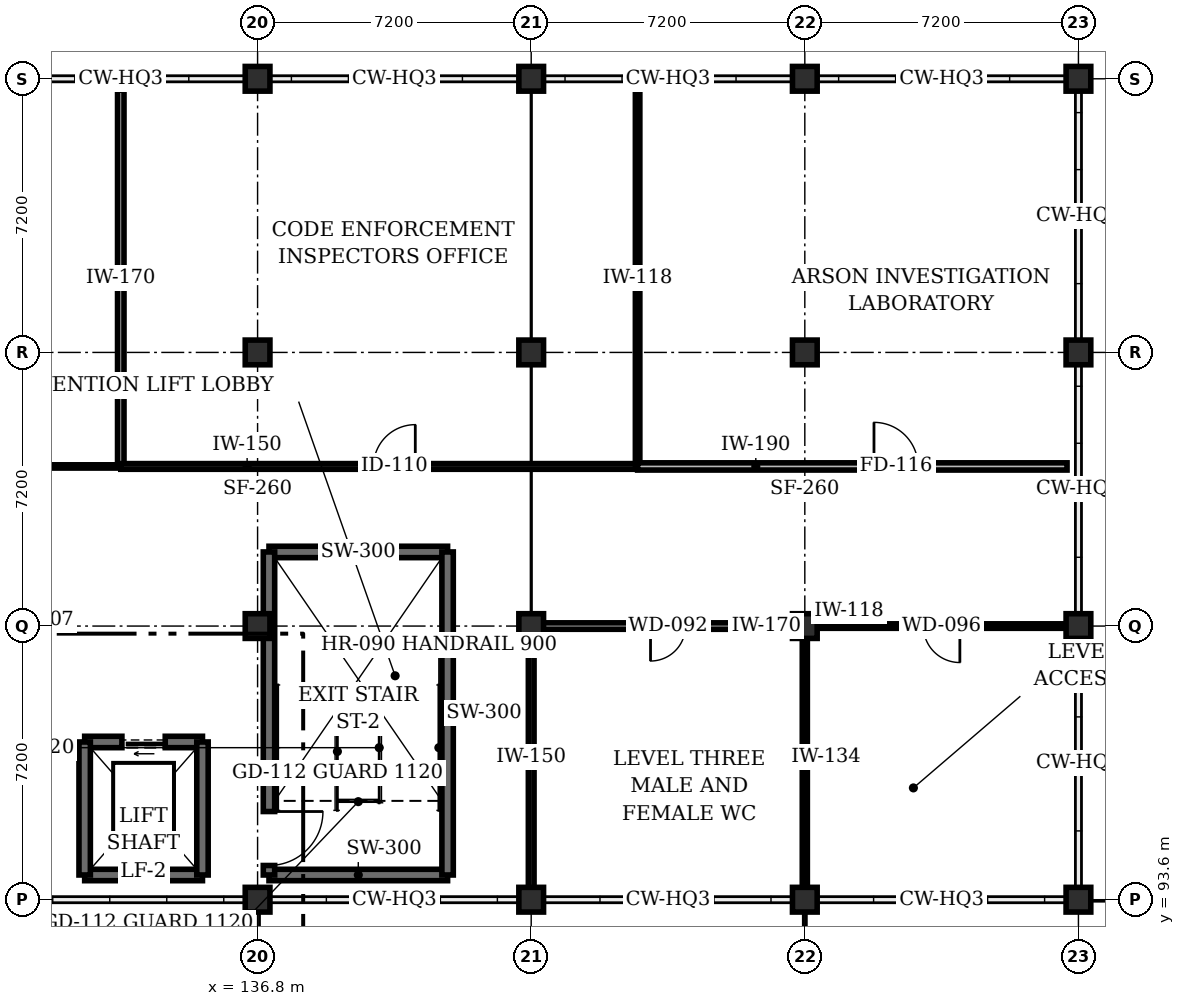
"""IFC4 building model, lengths in metres.
Left out: names, types, materials, properties, quantities, classifications, styles, units other than length and angle.
Written with IfcOpenShell. Run it as: python <this file> out.ifc"""

import sys

from ifc_helpers import new_model, si_unit, direction, frame, frame_2d, origin, origin_2d, place, context, subcontext, project, spatial, rectangle, extrude, element, fill, save


model = new_model("IFC4")
c1 = context("Model", 3, precision=1e-05, world=origin(), true_north=direction((0.0, 1.0)))
c2 = subcontext(c1, "Body", "Model", "MODEL_VIEW")
j1 = project(units=[si_unit("LENGTHUNIT", "METRE"), si_unit("PLANEANGLEUNIT", "RADIAN")], contexts=[c1])
p1 = place(None, origin())
s1 = spatial("IfcSite", under=j1, at=p1, CompositionType="ELEMENT")
p2 = place(p1, origin())
s2 = spatial("IfcBuilding", under=s1, at=p2, CompositionType="ELEMENT")
p3 = place(p2, frame((0.0, 0.0, 10.2)))
s3 = spatial("IfcBuildingStorey", under=s2, at=p3, CompositionType="ELEMENT", Elevation=10.2)
for number, where, z_axis, x_axis in (
    (1, (136.8, 93.6, 0.0), (0.0, 0.0, 1.0), (1.0, 0.0, 0.0)),
    (2, (136.8, 100.8, 0.0), (0.0, 0.0, 1.0), (1.0, 0.0, 0.0)),
    (3, (136.8, 108.0, 0.0), (0.0, 0.0, 1.0), (1.0, 0.0, 0.0)),
    (4, (136.8, 115.2, 0.0), (0.0, 0.0, 1.0), (1.0, 0.0, 0.0)),
    (5, (144.0, 93.6, 0.0), (0.0, 0.0, 1.0), (1.0, 0.0, 0.0)),
    (6, (144.0, 100.8, 0.0), (0.0, 0.0, 1.0), (1.0, 0.0, 0.0)),
    (7, (144.0, 108.0, 0.0), (0.0, 0.0, 1.0), (1.0, 0.0, 0.0)),
    (8, (144.0, 115.2, 0.0), (0.0, 0.0, 1.0), (1.0, 0.0, 0.0)),
    (9, (151.2, 93.6, 0.0), (0.0, 0.0, 1.0), (1.0, 0.0, 0.0)),
    (10, (151.2, 100.8, 0.0), (0.0, 0.0, 1.0), (1.0, 0.0, 0.0)),
    (11, (151.2, 108.0, 0.0), (0.0, 0.0, 1.0), (1.0, 0.0, 0.0)),
    (12, (151.2, 115.2, 0.0), (0.0, 0.0, 1.0), (1.0, 0.0, 0.0)),
    (13, (158.4, 93.6, 0.0), (0.0, 0.0, 1.0), (1.0, 0.0, 0.0)),
    (14, (158.4, 100.8, 0.0), (0.0, 0.0, 1.0), (1.0, 0.0, 0.0)),
    (15, (158.4, 108.0, 0.0), (0.0, 0.0, 1.0), (1.0, 0.0, 0.0)),
    (16, (158.4, 115.2, 0.0), (0.0, 0.0, 1.0), (1.0, 0.0, 0.0)),
):
    element("IfcColumn", number, at=place(p3, frame(where, z_axis=z_axis, x_axis=x_axis)), inside=s3, PredefinedType="COLUMN", context=c2, shape_type="SweptSolid", body=[
        extrude(rectangle(XDim=0.65, YDim=0.65, at=origin_2d()), origin(), (0.0, 0.0, 1.0), 4.2),
    ])
for number, where, z_axis, x_axis in (
    (17, (137.1, 94.25, 0.0), (0.0, 0.0, 1.0), (1.0, 0.0, 0.0)),
    (18, (141.8, 102.75, 0.0), (0.0, 0.0, 1.0), (-1.0, 0.0, 0.0)),
):
    element("IfcWall", number, at=place(p3, frame(where, z_axis=z_axis, x_axis=x_axis)), inside=s3, PredefinedType="SHEAR", context=c2, shape_type="SweptSolid", body=[
        extrude(rectangle(XDim=4.7, YDim=0.3, at=frame_2d((2.35, 0.0))), origin(), (0.0, 0.0, 1.0), 3.95),
    ])
p4 = place(p3, frame((137.1, 102.75, 0.0), z_axis=(0.0, 0.0, 1.0), x_axis=(0.0, -1.0, 0.0)))
e19 = element("IfcWall", 19, at=p4, inside=s3, PredefinedType="SHEAR", context=c2, shape_type="SweptSolid", body=[
    extrude(rectangle(XDim=8.5, YDim=0.3, at=frame_2d((4.25, 0.0))), origin(), (0.0, 0.0, 1.0), 3.95),
])
p5 = place(p4, frame((6.83, 0.0, 0.0)))
e20 = element("IfcOpeningElement", 20, at=p5, cuts=e19, PredefinedType="OPENING", context=c2, shape_type="SweptSolid", body=[
    extrude(rectangle(XDim=1.42, YDim=2.22, at=frame_2d((0.71, 1.11))), frame((0.0, 0.16, 0.0), z_axis=(0.0, -1.0, 0.0), x_axis=(1.0, 0.0, 0.0)), (0.0, 0.0, 1.0), 0.32),
])
p6 = place(p3, frame((141.8, 94.25, 0.0), z_axis=(0.0, 0.0, 1.0), x_axis=(0.0, 1.0, 0.0)))
e21 = element("IfcWall", 21, at=p6, inside=s3, PredefinedType="SHEAR", context=c2, shape_type="SweptSolid", body=[
    extrude(rectangle(XDim=8.5, YDim=0.3, at=frame_2d((4.25, 0.0))), origin(), (0.0, 0.0, 1.0), 3.95),
])
p7 = place(p3, frame((132.25, 94.25, 0.0), z_axis=(0.0, 0.0, 1.0), x_axis=(1.0, 0.0, 0.0)))
e22 = element("IfcWall", 22, at=p7, inside=s3, PredefinedType="SHEAR", context=c2, shape_type="SweptSolid", body=[
    extrude(rectangle(XDim=3.1, YDim=0.3, at=frame_2d((1.55, 0.0))), origin(), (0.0, 0.0, 1.0), 3.95),
])
p8 = place(p3, frame((135.35, 97.75, 0.0), z_axis=(0.0, 0.0, 1.0), x_axis=(-1.0, 0.0, 0.0)))
e23 = element("IfcWall", 23, at=p8, inside=s3, PredefinedType="SHEAR", context=c2, shape_type="SweptSolid", body=[
    extrude(rectangle(XDim=3.1, YDim=0.3, at=frame_2d((1.55, 0.0))), origin(), (0.0, 0.0, 1.0), 3.95),
])
p9 = place(p8, frame((0.98, 0.0, 0.0)))
e24 = element("IfcOpeningElement", 24, at=p9, cuts=e23, PredefinedType="OPENING", context=c2, shape_type="SweptSolid", body=[
    extrude(rectangle(XDim=1.14, YDim=2.24, at=frame_2d((0.57, 1.12))), frame((0.0, 0.16, 0.0), z_axis=(0.0, -1.0, 0.0), x_axis=(1.0, 0.0, 0.0)), (0.0, 0.0, 1.0), 0.32),
])
for number, where, z_axis, x_axis in (
    (25, (132.25, 97.75, 0.0), (0.0, 0.0, 1.0), (0.0, -1.0, 0.0)),
    (26, (135.35, 94.25, 0.0), (0.0, 0.0, 1.0), (0.0, 1.0, 0.0)),
):
    element("IfcWall", number, at=place(p3, frame(where, z_axis=z_axis, x_axis=x_axis)), inside=s3, PredefinedType="SHEAR", context=c2, shape_type="SweptSolid", body=[
        extrude(rectangle(XDim=3.5, YDim=0.3, at=frame_2d((1.75, 0.0))), origin(), (0.0, 0.0, 1.0), 3.95),
    ])
p10 = place(p3, frame((115.5, 105.0, 0.0), z_axis=(0.0, 0.0, 1.0), x_axis=(1.0, 0.0, 0.0)))
e27 = element("IfcWall", 27, at=p10, inside=s3, PredefinedType="STANDARD", context=c2, shape_type="SweptSolid", body=[
    extrude(rectangle(XDim=17.7, YDim=0.086, at=frame_2d((8.85, 0.0))), origin(), (0.0, 0.0, 1.0), 3.338),
])
p11 = place(p10, frame((9.93, 0.0, 0.0)))
e28 = element("IfcOpeningElement", 28, at=p11, cuts=e27, PredefinedType="OPENING", context=c2, shape_type="SweptSolid", body=[
    extrude(rectangle(XDim=1.14, YDim=2.2, at=frame_2d((0.57, 1.1))), frame((0.0, 0.053, 0.0), z_axis=(0.0, -1.0, 0.0), x_axis=(1.0, 0.0, 0.0)), (0.0, 0.0, 1.0), 0.106),
])
p12 = place(p3, frame((133.2, 105.0, 0.0), z_axis=(0.0, 0.0, 1.0), x_axis=(0.0, 1.0, 0.0)))
e29 = element("IfcWall", 29, at=p12, inside=s3, PredefinedType="STANDARD", context=c2, shape_type="SweptSolid", body=[
    extrude(rectangle(XDim=9.9, YDim=0.17, at=frame_2d((4.95, 0.0))), origin(), (0.0, 0.0, 1.0), 3.257),
])
p13 = place(p3, frame((133.2, 105.0, 0.0), z_axis=(0.0, 0.0, 1.0), x_axis=(1.0, 0.0, 0.0)))
e30 = element("IfcWall", 30, at=p13, inside=s3, PredefinedType="STANDARD", context=c2, shape_type="SweptSolid", body=[
    extrude(rectangle(XDim=13.6, YDim=0.15, at=frame_2d((6.8, 0.0))), origin(), (0.0, 0.0, 1.0), 3.338),
])
p14 = place(p13, frame((6.65, 0.0, 0.0)))
e31 = element("IfcOpeningElement", 31, at=p14, cuts=e30, PredefinedType="OPENING", context=c2, shape_type="SweptSolid", body=[
    extrude(rectangle(XDim=1.1, YDim=2.2, at=frame_2d((0.55, 1.1))), frame((0.0, 0.085, 0.0), z_axis=(0.0, -1.0, 0.0), x_axis=(1.0, 0.0, 0.0)), (0.0, 0.0, 1.0), 0.17),
])
p15 = place(p3, frame((146.8, 105.0, 0.0), z_axis=(0.0, 0.0, 1.0), x_axis=(0.0, 1.0, 0.0)))
e32 = element("IfcWall", 32, at=p15, inside=s3, PredefinedType="STANDARD", context=c2, shape_type="SweptSolid", body=[
    extrude(rectangle(XDim=9.9, YDim=0.118, at=frame_2d((4.95, 0.0))), origin(), (0.0, 0.0, 1.0), 3.257),
])
p16 = place(p3, frame((146.8, 105.0, 0.0), z_axis=(0.0, 0.0, 1.0), x_axis=(1.0, 0.0, 0.0)))
e33 = element("IfcWall", 33, at=p16, inside=s3, PredefinedType="STANDARD", context=c2, shape_type="SweptSolid", body=[
    extrude(rectangle(XDim=11.3, YDim=0.19, at=frame_2d((5.65, 0.0))), origin(), (0.0, 0.0, 1.0), 3.338),
])
p17 = place(p16, frame((6.22, 0.0, 0.0)))
e34 = element("IfcOpeningElement", 34, at=p17, cuts=e33, PredefinedType="OPENING", context=c2, shape_type="SweptSolid", body=[
    extrude(rectangle(XDim=1.16, YDim=2.18, at=frame_2d((0.58, 1.09))), frame((0.0, 0.105, 0.0), z_axis=(0.0, -1.0, 0.0), x_axis=(1.0, 0.0, 0.0)), (0.0, 0.0, 1.0), 0.21),
])
p18 = place(p3, frame((151.2, 100.8, 0.0), z_axis=(0.0, 0.0, 1.0), x_axis=(-1.0, 0.0, 0.0)))
e35 = element("IfcWall", 35, at=p18, inside=s3, PredefinedType="STANDARD", context=c2, shape_type="SweptSolid", body=[
    extrude(rectangle(XDim=7.2, YDim=0.17, at=frame_2d((3.6, 0.0))), origin(), (0.0, 0.0, 1.0), 3.257),
])
p19 = place(p18, frame((3.14, 0.0, 0.0)))
e36 = element("IfcOpeningElement", 36, at=p19, cuts=e35, PredefinedType="OPENING", context=c2, shape_type="SweptSolid", body=[
    extrude(rectangle(XDim=0.92, YDim=2.1, at=frame_2d((0.46, 1.05))), frame((0.0, 0.095, 0.0), z_axis=(0.0, -1.0, 0.0), x_axis=(1.0, 0.0, 0.0)), (0.0, 0.0, 1.0), 0.19),
])
p20 = place(p3, frame((144.0, 100.8, 0.0), z_axis=(0.0, 0.0, 1.0), x_axis=(0.0, -1.0, 0.0)))
e37 = element("IfcWall", 37, at=p20, inside=s3, PredefinedType="STANDARD", context=c2, shape_type="SweptSolid", body=[
    extrude(rectangle(XDim=6.9, YDim=0.15, at=frame_2d((3.45, 0.0))), origin(), (0.0, 0.0, 1.0), 3.257),
])
p21 = place(p3, frame((151.2, 93.9, 0.0), z_axis=(0.0, 0.0, 1.0), x_axis=(0.0, 1.0, 0.0)))
e38 = element("IfcWall", 38, at=p21, inside=s3, PredefinedType="STANDARD", context=c2, shape_type="SweptSolid", body=[
    extrude(rectangle(XDim=6.9, YDim=0.134, at=frame_2d((3.45, 0.0))), origin(), (0.0, 0.0, 1.0), 3.257),
])
p22 = place(p3, frame((158.1, 100.8, 0.0), z_axis=(0.0, 0.0, 1.0), x_axis=(-1.0, 0.0, 0.0)))
e39 = element("IfcWall", 39, at=p22, inside=s3, PredefinedType="STANDARD", context=c2, shape_type="SweptSolid", body=[
    extrude(rectangle(XDim=6.9, YDim=0.118, at=frame_2d((3.45, 0.0))), origin(), (0.0, 0.0, 1.0), 3.257),
])
p23 = place(p22, frame((2.82, 0.0, 0.0)))
e40 = element("IfcOpeningElement", 40, at=p23, cuts=e39, PredefinedType="OPENING", context=c2, shape_type="SweptSolid", body=[
    extrude(rectangle(XDim=0.96, YDim=2.1, at=frame_2d((0.48, 1.05))), frame((0.0, 0.069, 0.0), z_axis=(0.0, -1.0, 0.0), x_axis=(1.0, 0.0, 0.0)), (0.0, 0.0, 1.0), 0.138),
])
p24 = place(p5, origin())
e41 = element("IfcDoor", 41, at=p24, inside=s3, OperationType="SINGLE_SWING_LEFT", PredefinedType="DOOR", context=c2, shape_type="SweptSolid", body=[
    extrude(rectangle(XDim=1.42, YDim=2.22, at=frame_2d((0.71, 1.11))), frame((0.0, 0.025, 0.0), z_axis=(0.0, -1.0, 0.0), x_axis=(1.0, 0.0, 0.0)), (0.0, 0.0, 1.0), 0.05),
])
fill(e20, e41)
p25 = place(p9, origin())
e42 = element("IfcDoor", 42, at=p25, inside=s3, OperationType="SLIDING_TO_LEFT", PredefinedType="DOOR", context=c2, shape_type="SweptSolid", body=[
    extrude(rectangle(XDim=1.14, YDim=2.24, at=frame_2d((0.57, 1.12))), frame((0.0, 0.025, 0.0), z_axis=(0.0, -1.0, 0.0), x_axis=(1.0, 0.0, 0.0)), (0.0, 0.0, 1.0), 0.05),
])
fill(e24, e42)
p26 = place(p14, origin())
e43 = element("IfcDoor", 43, at=p26, inside=s3, OperationType="SINGLE_SWING_RIGHT", PredefinedType="DOOR", context=c2, shape_type="SweptSolid", body=[
    extrude(rectangle(XDim=1.1, YDim=2.2, at=frame_2d((0.55, 1.1))), frame((0.0, 0.025, 0.0), z_axis=(0.0, -1.0, 0.0), x_axis=(1.0, 0.0, 0.0)), (0.0, 0.0, 1.0), 0.05),
])
fill(e31, e43)
p27 = place(p17, origin())
e44 = element("IfcDoor", 44, at=p27, inside=s3, OperationType="SINGLE_SWING_LEFT", PredefinedType="DOOR", context=c2, shape_type="SweptSolid", body=[
    extrude(rectangle(XDim=1.16, YDim=2.18, at=frame_2d((0.58, 1.09))), frame((0.0, 0.025, 0.0), z_axis=(0.0, -1.0, 0.0), x_axis=(1.0, 0.0, 0.0)), (0.0, 0.0, 1.0), 0.05),
])
fill(e34, e44)
p28 = place(p19, origin())
e45 = element("IfcDoor", 45, at=p28, inside=s3, OperationType="SINGLE_SWING_RIGHT", PredefinedType="DOOR", context=c2, shape_type="SweptSolid", body=[
    extrude(rectangle(XDim=0.92, YDim=2.1, at=frame_2d((0.46, 1.05))), frame((0.0, 0.025, 0.0), z_axis=(0.0, -1.0, 0.0), x_axis=(1.0, 0.0, 0.0)), (0.0, 0.0, 1.0), 0.05),
])
fill(e36, e45)
p29 = place(p23, origin())
e46 = element("IfcDoor", 46, at=p29, inside=s3, OperationType="SINGLE_SWING_LEFT", PredefinedType="DOOR", context=c2, shape_type="SweptSolid", body=[
    extrude(rectangle(XDim=0.96, YDim=2.1, at=frame_2d((0.48, 1.05))), frame((0.0, 0.025, 0.0), z_axis=(0.0, -1.0, 0.0), x_axis=(1.0, 0.0, 0.0)), (0.0, 0.0, 1.0), 0.05),
])
fill(e40, e46)
save(model, sys.argv[1])
